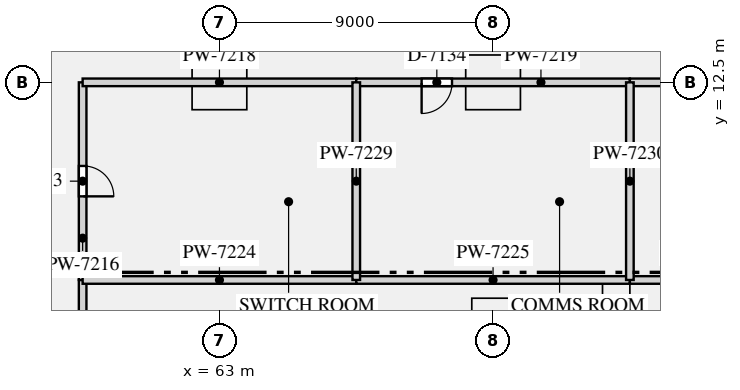
"""IFC4 building model, lengths in metres.
Left out: names, types, materials, properties, quantities, classifications, styles, units other than length and angle.
Written with IfcOpenShell. Run it as: python <this file> out.ifc"""

import sys

from ifc_helpers import new_model, si_unit, direction, frame, frame_2d, origin, origin_2d, place, context, subcontext, project, spatial, rectangle, extrude, element, fill, save


model = new_model("IFC4")
c1 = context("Model", 3, precision=1e-05, world=origin(), true_north=direction((0.0, 1.0)))
c2 = subcontext(c1, "Body", "Model", "MODEL_VIEW")
j1 = project(units=[si_unit("LENGTHUNIT", "METRE"), si_unit("PLANEANGLEUNIT", "RADIAN")], contexts=[c1])
p1 = place(None, origin())
s1 = spatial("IfcSite", under=j1, at=p1, CompositionType="ELEMENT")
p2 = place(p1, origin())
s2 = spatial("IfcBuilding", under=s1, at=p2, CompositionType="ELEMENT")
p3 = place(p2, origin())
s3 = spatial("IfcBuildingStorey", under=s2, at=p3, CompositionType="ELEMENT", Elevation=0.0)
for number, where, z_axis, x_axis in (
    (1, (72.0, 4.95, 0.0), (0.0, 0.0, 1.0), (1.0, 0.0, 0.0)),
    (2, (76.05, 5.2, 0.0), (0.0, 0.0, 1.0), (0.0, 1.0, 0.0)),
):
    element("IfcColumn", number, at=place(p3, frame(where, z_axis=z_axis, x_axis=x_axis)), inside=s3, PredefinedType="USERDEFINED", context=c2, shape_type="SweptSolid", body=[
        extrude(rectangle(XDim=1.4, YDim=0.9, at=origin_2d()), origin(), (0.0, 0.0, 1.0), 6.5),
    ])
for number, where, z_axis, x_axis in (
    (3, (63.0, 12.5, 0.0), (0.0, 0.0, 1.0), (1.0, 0.0, 0.0)),
    (4, (72.0, 12.5, 0.0), (0.0, 0.0, 1.0), (1.0, 0.0, 0.0)),
):
    element("IfcColumn", number, at=place(p3, frame(where, z_axis=z_axis, x_axis=x_axis)), inside=s3, PredefinedType="COLUMN", context=c2, shape_type="SweptSolid", body=[
        extrude(rectangle(XDim=1.8, YDim=1.8, at=origin_2d()), origin(), (0.0, 0.0, 1.0), 6.5),
    ])
p4 = place(p3, frame((58.5, -9.0, 0.0), z_axis=(0.0, 0.0, 1.0), x_axis=(0.0, 1.0, 0.0)))
e5 = element("IfcWall", 5, at=p4, inside=s3, PredefinedType="PARTITIONING", context=c2, shape_type="SweptSolid", body=[
    extrude(rectangle(XDim=15.0, YDim=0.25, at=frame_2d((7.5, 0.0))), origin(), (0.0, 0.0, 1.0), 6.098),
])
p5 = place(p4, frame((8.1, 0.0, 0.0)))
e6 = element("IfcOpeningElement", 6, at=p5, cuts=e5, PredefinedType="OPENING", context=c2, shape_type="SweptSolid", body=[
    extrude(rectangle(XDim=1.8, YDim=2.4, at=frame_2d((0.9, 1.2))), frame((0.0, 0.135, 0.0), z_axis=(0.0, -1.0, 0.0), x_axis=(1.0, 0.0, 0.0)), (0.0, 0.0, 1.0), 0.27),
])
p6 = place(p3, frame((58.5, 6.0, 0.0), z_axis=(0.0, 0.0, 1.0), x_axis=(0.0, 1.0, 0.0)))
e7 = element("IfcWall", 7, at=p6, inside=s3, PredefinedType="PARTITIONING", context=c2, shape_type="SweptSolid", body=[
    extrude(rectangle(XDim=6.5, YDim=0.25, at=frame_2d((3.25, 0.0))), origin(), (0.0, 0.0, 1.0), 6.098),
])
p7 = place(p6, frame((2.75, 0.0, 0.0)))
e8 = element("IfcOpeningElement", 8, at=p7, cuts=e7, PredefinedType="OPENING", context=c2, shape_type="SweptSolid", body=[
    extrude(rectangle(XDim=1.0, YDim=2.1, at=frame_2d((0.5, 1.05))), frame((0.0, 0.135, 0.0), z_axis=(0.0, -1.0, 0.0), x_axis=(1.0, 0.0, 0.0)), (0.0, 0.0, 1.0), 0.27),
])
p8 = place(p3, frame((58.5, 12.5, 0.0), z_axis=(0.0, 0.0, 1.0), x_axis=(1.0, 0.0, 0.0)))
e9 = element("IfcWall", 9, at=p8, inside=s3, PredefinedType="PARTITIONING", context=c2, shape_type="SweptSolid", body=[
    extrude(rectangle(XDim=9.0, YDim=0.25, at=frame_2d((4.5, 0.0))), origin(), (0.0, 0.0, 1.0), 6.098),
])
p9 = place(p3, frame((67.5, 12.5, 0.0), z_axis=(0.0, 0.0, 1.0), x_axis=(1.0, 0.0, 0.0)))
e10 = element("IfcWall", 10, at=p9, inside=s3, PredefinedType="PARTITIONING", context=c2, shape_type="SweptSolid", body=[
    extrude(rectangle(XDim=9.0, YDim=0.25, at=frame_2d((4.5, 0.0))), origin(), (0.0, 0.0, 1.0), 6.098),
])
p10 = place(p9, frame((2.15, 0.0, 0.0)))
e11 = element("IfcOpeningElement", 11, at=p10, cuts=e10, PredefinedType="OPENING", context=c2, shape_type="SweptSolid", body=[
    extrude(rectangle(XDim=1.0, YDim=2.1, at=frame_2d((0.5, 1.05))), frame((0.0, 0.135, 0.0), z_axis=(0.0, -1.0, 0.0), x_axis=(1.0, 0.0, 0.0)), (0.0, 0.0, 1.0), 0.27),
])
p11 = place(p3, frame((76.5, 12.5, 0.0), z_axis=(0.0, 0.0, 1.0), x_axis=(1.0, 0.0, 0.0)))
e12 = element("IfcWall", 12, at=p11, inside=s3, PredefinedType="PARTITIONING", context=c2, shape_type="SweptSolid", body=[
    extrude(rectangle(XDim=13.5, YDim=0.25, at=frame_2d((6.75, 0.0))), origin(), (0.0, 0.0, 1.0), 6.098),
])
p12 = place(p11, frame((6.25, 0.0, 0.0)))
e13 = element("IfcOpeningElement", 13, at=p12, cuts=e12, PredefinedType="OPENING", context=c2, shape_type="SweptSolid", body=[
    extrude(rectangle(XDim=1.0, YDim=2.1, at=frame_2d((0.5, 1.05))), frame((0.0, 0.135, 0.0), z_axis=(0.0, -1.0, 0.0), x_axis=(1.0, 0.0, 0.0)), (0.0, 0.0, 1.0), 0.27),
])
for number, where, z_axis, x_axis in (
    (14, (58.5, 6.0, 0.0), (0.0, 0.0, 1.0), (1.0, 0.0, 0.0)),
    (15, (67.5, 6.0, 0.0), (0.0, 0.0, 1.0), (1.0, 0.0, 0.0)),
):
    element("IfcWall", number, at=place(p3, frame(where, z_axis=z_axis, x_axis=x_axis)), inside=s3, PredefinedType="PARTITIONING", context=c2, shape_type="SweptSolid", body=[
        extrude(rectangle(XDim=9.0, YDim=0.25, at=frame_2d((4.5, 0.0))), origin(), (0.0, 0.0, 1.0), 6.098),
    ])
p13 = place(p3, frame((76.5, 6.0, 0.0), z_axis=(0.0, 0.0, 1.0), x_axis=(1.0, 0.0, 0.0)))
e16 = element("IfcWall", 16, at=p13, inside=s3, PredefinedType="PARTITIONING", context=c2, shape_type="SweptSolid", body=[
    extrude(rectangle(XDim=4.5, YDim=0.25, at=frame_2d((2.25, 0.0))), origin(), (0.0, 0.0, 1.0), 6.098),
])
for number, where, z_axis, x_axis in (
    (17, (67.5, 6.0, 0.0), (0.0, 0.0, 1.0), (0.0, 1.0, 0.0)),
    (18, (76.5, 6.0, 0.0), (0.0, 0.0, 1.0), (0.0, 1.0, 0.0)),
):
    element("IfcWall", number, at=place(p3, frame(where, z_axis=z_axis, x_axis=x_axis)), inside=s3, PredefinedType="PARTITIONING", context=c2, shape_type="SweptSolid", body=[
        extrude(rectangle(XDim=6.5, YDim=0.25, at=frame_2d((3.25, 0.0))), origin(), (0.0, 0.0, 1.0), 6.098),
    ])
p14 = place(p7, frame((1.0, 0.0, 0.0), z_axis=(0.0, 0.0, 1.0), x_axis=(-1.0, 0.0, 0.0)))
e19 = element("IfcDoor", 19, at=p14, inside=s3, OperationType="SINGLE_SWING_RIGHT", PredefinedType="DOOR", context=c2, shape_type="SweptSolid", body=[
    extrude(rectangle(XDim=1.0, YDim=2.1, at=frame_2d((0.5, 1.05))), frame((0.0, 0.025, 0.0), z_axis=(0.0, -1.0, 0.0), x_axis=(1.0, 0.0, 0.0)), (0.0, 0.0, 1.0), 0.05),
])
fill(e8, e19)
p15 = place(p10, frame((1.0, 0.0, 0.0), z_axis=(0.0, 0.0, 1.0), x_axis=(-1.0, 0.0, 0.0)))
e20 = element("IfcDoor", 20, at=p15, inside=s3, OperationType="SINGLE_SWING_RIGHT", PredefinedType="DOOR", context=c2, shape_type="SweptSolid", body=[
    extrude(rectangle(XDim=1.0, YDim=2.1, at=frame_2d((0.5, 1.05))), frame((0.0, 0.025, 0.0), z_axis=(0.0, -1.0, 0.0), x_axis=(1.0, 0.0, 0.0)), (0.0, 0.0, 1.0), 0.05),
])
fill(e11, e20)
save(model, sys.argv[1])
